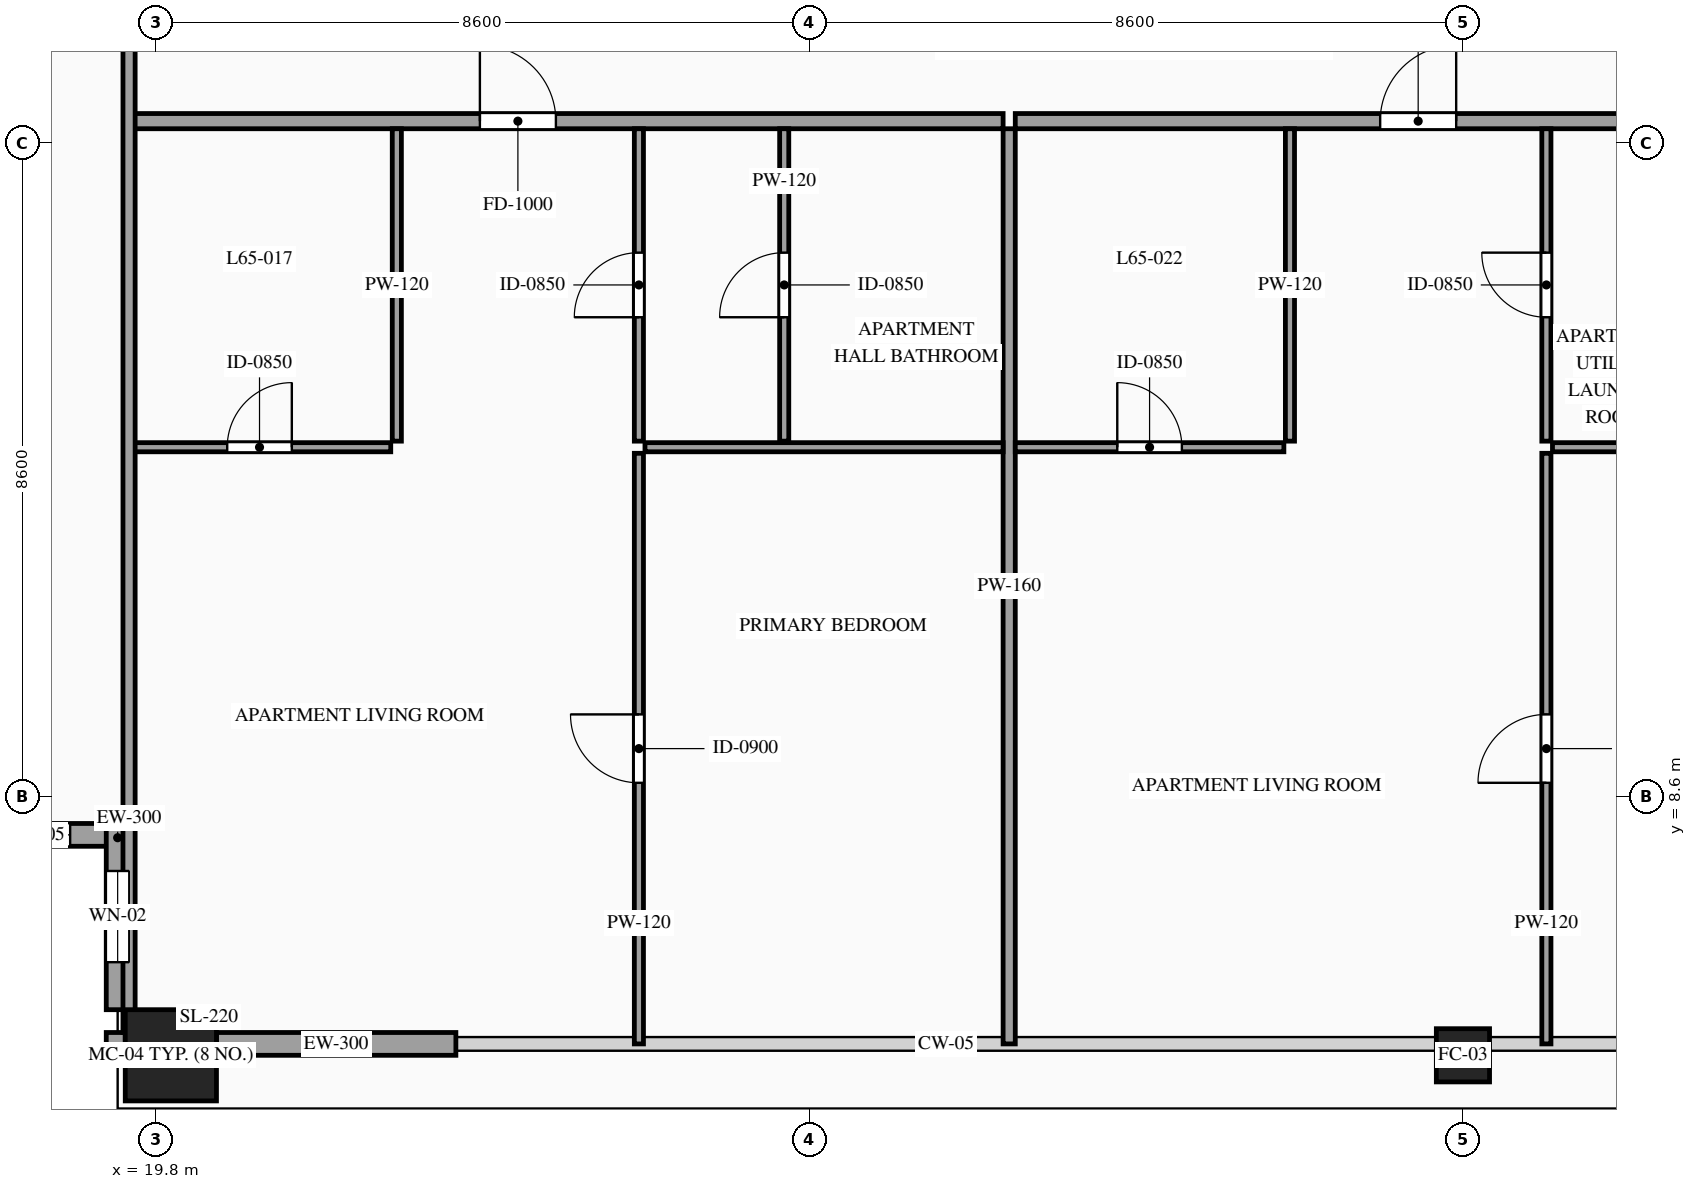
"""IFC4 building model, lengths in metres.
Left out: names, types, materials, properties, quantities, classifications, styles, units other than length and angle.
Written with IfcOpenShell. Run it as: python <this file> out.ifc"""

import sys

from ifc_helpers import new_model, si_unit, direction, frame, frame_2d, origin, origin_2d, place, context, subcontext, project, spatial, rectangle, hollow_rectangle, extrude, source, transform, mapped, element, fill, save


model = new_model("IFC4")
c1 = context("Model", 3, precision=1e-05, world=origin(), true_north=direction((0.0, 1.0)))
c2 = subcontext(c1, "Body", "Model", "MODEL_VIEW")
j1 = project(units=[si_unit("LENGTHUNIT", "METRE"), si_unit("PLANEANGLEUNIT", "RADIAN")], contexts=[c1])
p1 = place(None, origin())
s1 = spatial("IfcSite", under=j1, at=p1, CompositionType="ELEMENT")
p2 = place(p1, origin())
s2 = spatial("IfcBuilding", under=s1, at=p2, CompositionType="ELEMENT")
p3 = place(p2, frame((0.0, 0.0, 245.1)))
s3 = spatial("IfcBuildingStorey", under=s2, at=p3, CompositionType="ELEMENT", Elevation=245.1)
m1 = source(origin(), c2, "Body", "SweptSolid", [
    extrude(hollow_rectangle(XDim=1.2, YDim=1.2, WallThickness=0.055, at=origin_2d()), origin(), (0.0, 0.0, 1.0), 3.5),
])
p4 = place(p3, frame((20.0, 5.2, 0.0), z_axis=(0.0, 0.0, 1.0), x_axis=(1.0, 0.0, 0.0)))
e1 = element("IfcColumn", 1, at=p4, inside=s3, PredefinedType="COLUMN", context=c2, shape_type="MappedRepresentation", body=[
    mapped(m1, transform((0.0, 0.0, 0.0), scale=1.0)),
])
m2 = source(origin(), c2, "Body", "SweptSolid", [
    extrude(hollow_rectangle(XDim=0.7, YDim=0.7, WallThickness=0.032, at=origin_2d()), origin(), (0.0, 0.0, 1.0), 3.5),
])
p5 = place(p3, frame((37.0, 5.2, 0.0), z_axis=(0.0, 0.0, 1.0), x_axis=(1.0, 0.0, 0.0)))
e2 = element("IfcColumn", 2, at=p5, inside=s3, PredefinedType="COLUMN", context=c2, shape_type="MappedRepresentation", body=[
    mapped(m2, transform((0.0, 0.0, 0.0), scale=1.0)),
])
p6 = place(p3, frame((17.0, 8.1, 0.0), z_axis=(0.0, 0.0, 1.0), x_axis=(1.0, 0.0, 0.0)))
e3 = element("IfcWall", 3, at=p6, inside=s3, PredefinedType="SOLIDWALL", context=c2, shape_type="SweptSolid", body=[
    extrude(rectangle(XDim=2.45, YDim=0.3, at=frame_2d((1.225, 0.0))), origin(), (0.0, 0.0, 1.0), 3.28),
])
p7 = place(p6, frame((0.775, 0.0, 0.85)))
e4 = element("IfcOpeningElement", 4, at=p7, cuts=e3, PredefinedType="OPENING", context=c2, shape_type="SweptSolid", body=[
    extrude(rectangle(XDim=0.9, YDim=1.5, at=frame_2d((0.45, 0.75))), frame((0.0, 0.165, 0.0), z_axis=(0.0, -1.0, 0.0), x_axis=(1.0, 0.0, 0.0)), (0.0, 0.0, 1.0), 0.33),
])
p8 = place(p3, frame((19.3, 8.25, 0.0), z_axis=(0.0, 0.0, 1.0), x_axis=(0.0, -1.0, 0.0)))
e5 = element("IfcWall", 5, at=p8, inside=s3, PredefinedType="SOLIDWALL", context=c2, shape_type="SweptSolid", body=[
    extrude(rectangle(XDim=2.45, YDim=0.3, at=frame_2d((1.225, 0.0))), origin(), (0.0, 0.0, 1.0), 3.28),
])
p9 = place(p8, frame((0.625, 0.0, 0.85)))
e6 = element("IfcOpeningElement", 6, at=p9, cuts=e5, PredefinedType="OPENING", context=c2, shape_type="SweptSolid", body=[
    extrude(rectangle(XDim=1.2, YDim=2.1, at=frame_2d((0.6, 1.05))), frame((0.0, 0.165, 0.0), z_axis=(0.0, -1.0, 0.0), x_axis=(1.0, 0.0, 0.0)), (0.0, 0.0, 1.0), 0.33),
])
m3 = source(origin(), c2, "Body", "SweptSolid", [
    extrude(rectangle(XDim=0.25, YDim=0.3, at=frame_2d((0.125, 0.0))), origin(), (0.0, 0.0, 1.0), 3.28),
])
p10 = place(p3, frame((19.15, 5.35, 0.0), z_axis=(0.0, 0.0, 1.0), x_axis=(1.0, 0.0, 0.0)))
e7 = element("IfcWall", 7, at=p10, inside=s3, PredefinedType="SOLIDWALL", context=c2, shape_type="MappedRepresentation", body=[
    mapped(m3, transform((0.0, 0.0, 0.0), scale=1.0)),
])
m4 = source(origin(), c2, "Body", "SweptSolid", [
    extrude(rectangle(XDim=3.15, YDim=0.3, at=frame_2d((1.575, 0.0))), origin(), (0.0, 0.0, 1.0), 2.835),
])
p11 = place(p3, frame((20.6, 5.35, 0.0), z_axis=(0.0, 0.0, 1.0), x_axis=(1.0, 0.0, 0.0)))
e8 = element("IfcWall", 8, at=p11, inside=s3, PredefinedType="SOLIDWALL", context=c2, shape_type="MappedRepresentation", body=[
    mapped(m4, transform((0.0, 0.0, 0.0), scale=1.0)),
])
p12 = place(p3, frame((19.44, 17.49, 0.0), z_axis=(0.0, 0.0, 1.0), x_axis=(1.0, 0.0, 0.0)))
e9 = element("IfcWall", 9, at=p12, inside=s3, PredefinedType="PARTITIONING", context=c2, shape_type="SweptSolid", body=[
    extrude(rectangle(XDim=11.51, YDim=0.2, at=frame_2d((5.755, 0.0))), origin(), (0.0, 0.0, 1.0), 3.28),
])
p13 = place(p12, frame((4.626, 0.0, 0.0)))
e10 = element("IfcOpeningElement", 10, at=p13, cuts=e9, PredefinedType="OPENING", context=c2, shape_type="SweptSolid", body=[
    extrude(rectangle(XDim=1.0, YDim=2.2, at=frame_2d((0.5, 1.1))), frame((0.0, 0.115, 0.0), z_axis=(0.0, -1.0, 0.0), x_axis=(1.0, 0.0, 0.0)), (0.0, 0.0, 1.0), 0.23),
])
m5 = source(origin(), c2, "Body", "SweptSolid", [
    extrude(rectangle(XDim=12.04, YDim=0.16, at=frame_2d((6.02, 0.0))), origin(), (0.0, 0.0, 1.0), 3.28),
])
p14 = place(p3, frame((31.03, 5.35, 0.0), z_axis=(0.0, 0.0, 1.0), x_axis=(0.0, 1.0, 0.0)))
e11 = element("IfcWall", 11, at=p14, inside=s3, PredefinedType="PARTITIONING", context=c2, shape_type="MappedRepresentation", body=[
    mapped(m5, transform((0.0, 0.0, 0.0), scale=1.0)),
])
p15 = place(p3, frame((19.44, 13.2, 0.0), z_axis=(0.0, 0.0, 1.0), x_axis=(1.0, 0.0, 0.0)))
e12 = element("IfcWall", 12, at=p15, inside=s3, PredefinedType="PARTITIONING", context=c2, shape_type="SweptSolid", body=[
    extrude(rectangle(XDim=3.453, YDim=0.12, at=frame_2d((1.727, 0.0))), origin(), (0.0, 0.0, 1.0), 3.28),
])
p16 = place(p15, frame((1.302, 0.0, 0.0)))
e13 = element("IfcOpeningElement", 13, at=p16, cuts=e12, PredefinedType="OPENING", context=c2, shape_type="SweptSolid", body=[
    extrude(rectangle(XDim=0.85, YDim=2.1, at=frame_2d((0.425, 1.05))), frame((0.0, 0.075, 0.0), z_axis=(0.0, -1.0, 0.0), x_axis=(1.0, 0.0, 0.0)), (0.0, 0.0, 1.0), 0.15),
])
m6 = source(origin(), c2, "Body", "SweptSolid", [
    extrude(rectangle(XDim=4.11, YDim=0.12, at=frame_2d((2.055, 0.0))), origin(), (0.0, 0.0, 1.0), 3.28),
])
p17 = place(p3, frame((22.973, 13.28, 0.0), z_axis=(0.0, 0.0, 1.0), x_axis=(0.0, 1.0, 0.0)))
e14 = element("IfcWall", 14, at=p17, inside=s3, PredefinedType="PARTITIONING", context=c2, shape_type="MappedRepresentation", body=[
    mapped(m6, transform((0.0, 0.0, 0.0), scale=1.0)),
])
p18 = place(p3, frame((28.07, 13.28, 0.0), z_axis=(0.0, 0.0, 1.0), x_axis=(0.0, 1.0, 0.0)))
e15 = element("IfcWall", 15, at=p18, inside=s3, PredefinedType="PARTITIONING", context=c2, shape_type="SweptSolid", body=[
    extrude(rectangle(XDim=4.11, YDim=0.12, at=frame_2d((2.055, 0.0))), origin(), (0.0, 0.0, 1.0), 3.28),
])
p19 = place(p18, frame((1.63, 0.0, 0.0)))
e16 = element("IfcOpeningElement", 16, at=p19, cuts=e15, PredefinedType="OPENING", context=c2, shape_type="SweptSolid", body=[
    extrude(rectangle(XDim=0.85, YDim=2.1, at=frame_2d((0.425, 1.05))), frame((0.0, 0.075, 0.0), z_axis=(0.0, -1.0, 0.0), x_axis=(1.0, 0.0, 0.0)), (0.0, 0.0, 1.0), 0.15),
])
m7 = source(origin(), c2, "Body", "SweptSolid", [
    extrude(rectangle(XDim=4.712, YDim=0.12, at=frame_2d((2.356, 0.0))), origin(), (0.0, 0.0, 1.0), 3.28),
])
p20 = place(p3, frame((26.238, 13.2, 0.0), z_axis=(0.0, 0.0, 1.0), x_axis=(1.0, 0.0, 0.0)))
e17 = element("IfcWall", 17, at=p20, inside=s3, PredefinedType="PARTITIONING", context=c2, shape_type="MappedRepresentation", body=[
    mapped(m7, transform((0.0, 0.0, 0.0), scale=1.0)),
])
p21 = place(p3, frame((26.158, 5.35, 0.0), z_axis=(0.0, 0.0, 1.0), x_axis=(0.0, 1.0, 0.0)))
e18 = element("IfcWall", 18, at=p21, inside=s3, PredefinedType="PARTITIONING", context=c2, shape_type="SweptSolid", body=[
    extrude(rectangle(XDim=7.77, YDim=0.12, at=frame_2d((3.885, 0.0))), origin(), (0.0, 0.0, 1.0), 3.28),
])
p22 = place(p21, frame((3.435, 0.0, 0.0)))
e19 = element("IfcOpeningElement", 19, at=p22, cuts=e18, PredefinedType="OPENING", context=c2, shape_type="SweptSolid", body=[
    extrude(rectangle(XDim=0.9, YDim=2.15, at=frame_2d((0.45, 1.075))), frame((0.0, 0.075, 0.0), z_axis=(0.0, -1.0, 0.0), x_axis=(1.0, 0.0, 0.0)), (0.0, 0.0, 1.0), 0.15),
])
p23 = place(p3, frame((26.158, 13.28, 0.0), z_axis=(0.0, 0.0, 1.0), x_axis=(0.0, 1.0, 0.0)))
e20 = element("IfcWall", 20, at=p23, inside=s3, PredefinedType="PARTITIONING", context=c2, shape_type="SweptSolid", body=[
    extrude(rectangle(XDim=4.11, YDim=0.12, at=frame_2d((2.055, 0.0))), origin(), (0.0, 0.0, 1.0), 3.28),
])
p24 = place(p23, frame((1.63, 0.0, 0.0)))
e21 = element("IfcOpeningElement", 21, at=p24, cuts=e20, PredefinedType="OPENING", context=c2, shape_type="SweptSolid", body=[
    extrude(rectangle(XDim=0.85, YDim=2.1, at=frame_2d((0.425, 1.05))), frame((0.0, 0.075, 0.0), z_axis=(0.0, -1.0, 0.0), x_axis=(1.0, 0.0, 0.0)), (0.0, 0.0, 1.0), 0.15),
])
p25 = place(p3, frame((31.11, 17.49, 0.0), z_axis=(0.0, 0.0, 1.0), x_axis=(1.0, 0.0, 0.0)))
e22 = element("IfcWall", 22, at=p25, inside=s3, PredefinedType="PARTITIONING", context=c2, shape_type="SweptSolid", body=[
    extrude(rectangle(XDim=11.78, YDim=0.2, at=frame_2d((5.89, 0.0))), origin(), (0.0, 0.0, 1.0), 3.28),
])
p26 = place(p25, frame((4.801, 0.0, 0.0)))
e23 = element("IfcOpeningElement", 23, at=p26, cuts=e22, PredefinedType="OPENING", context=c2, shape_type="SweptSolid", body=[
    extrude(rectangle(XDim=1.0, YDim=2.2, at=frame_2d((0.5, 1.1))), frame((0.0, 0.115, 0.0), z_axis=(0.0, -1.0, 0.0), x_axis=(1.0, 0.0, 0.0)), (0.0, 0.0, 1.0), 0.23),
])
p27 = place(p3, frame((31.11, 13.2, 0.0), z_axis=(0.0, 0.0, 1.0), x_axis=(1.0, 0.0, 0.0)))
e24 = element("IfcWall", 24, at=p27, inside=s3, PredefinedType="PARTITIONING", context=c2, shape_type="SweptSolid", body=[
    extrude(rectangle(XDim=3.534, YDim=0.12, at=frame_2d((1.767, 0.0))), origin(), (0.0, 0.0, 1.0), 3.28),
])
p28 = place(p27, frame((1.342, 0.0, 0.0)))
e25 = element("IfcOpeningElement", 25, at=p28, cuts=e24, PredefinedType="OPENING", context=c2, shape_type="SweptSolid", body=[
    extrude(rectangle(XDim=0.85, YDim=2.1, at=frame_2d((0.425, 1.05))), frame((0.0, 0.075, 0.0), z_axis=(0.0, -1.0, 0.0), x_axis=(1.0, 0.0, 0.0)), (0.0, 0.0, 1.0), 0.15),
])
p29 = place(p3, frame((34.724, 13.28, 0.0), z_axis=(0.0, 0.0, 1.0), x_axis=(0.0, 1.0, 0.0)))
e26 = element("IfcWall", 26, at=p29, inside=s3, PredefinedType="PARTITIONING", context=c2, shape_type="MappedRepresentation", body=[
    mapped(m6, transform((0.0, 0.0, 0.0), scale=1.0)),
])
p30 = place(p3, frame((38.178, 13.2, 0.0), z_axis=(0.0, 0.0, 1.0), x_axis=(1.0, 0.0, 0.0)))
e27 = element("IfcWall", 27, at=p30, inside=s3, PredefinedType="PARTITIONING", context=c2, shape_type="MappedRepresentation", body=[
    mapped(m7, transform((0.0, 0.0, 0.0), scale=1.0)),
])
p31 = place(p3, frame((38.098, 5.35, 0.0), z_axis=(0.0, 0.0, 1.0), x_axis=(0.0, 1.0, 0.0)))
e28 = element("IfcWall", 28, at=p31, inside=s3, PredefinedType="PARTITIONING", context=c2, shape_type="SweptSolid", body=[
    extrude(rectangle(XDim=7.77, YDim=0.12, at=frame_2d((3.885, 0.0))), origin(), (0.0, 0.0, 1.0), 3.28),
])
p32 = place(p31, frame((3.435, 0.0, 0.0)))
e29 = element("IfcOpeningElement", 29, at=p32, cuts=e28, PredefinedType="OPENING", context=c2, shape_type="SweptSolid", body=[
    extrude(rectangle(XDim=0.9, YDim=2.15, at=frame_2d((0.45, 1.075))), frame((0.0, 0.075, 0.0), z_axis=(0.0, -1.0, 0.0), x_axis=(1.0, 0.0, 0.0)), (0.0, 0.0, 1.0), 0.15),
])
p33 = place(p3, frame((38.098, 13.28, 0.0), z_axis=(0.0, 0.0, 1.0), x_axis=(0.0, 1.0, 0.0)))
e30 = element("IfcWall", 30, at=p33, inside=s3, PredefinedType="PARTITIONING", context=c2, shape_type="SweptSolid", body=[
    extrude(rectangle(XDim=4.11, YDim=0.12, at=frame_2d((2.055, 0.0))), origin(), (0.0, 0.0, 1.0), 3.28),
])
p34 = place(p33, frame((1.63, 0.0, 0.0)))
e31 = element("IfcOpeningElement", 31, at=p34, cuts=e30, PredefinedType="OPENING", context=c2, shape_type="SweptSolid", body=[
    extrude(rectangle(XDim=0.85, YDim=2.1, at=frame_2d((0.425, 1.05))), frame((0.0, 0.075, 0.0), z_axis=(0.0, -1.0, 0.0), x_axis=(1.0, 0.0, 0.0)), (0.0, 0.0, 1.0), 0.15),
])
m8 = source(origin(), c2, "Body", "SweptSolid", [
    extrude(rectangle(XDim=26.69, YDim=0.16, at=frame_2d((13.345, 0.0))), origin(), (0.0, 0.0, 1.0), 3.28),
])
p35 = place(p3, frame((19.45, 5.5, 0.0), z_axis=(0.0, 0.0, 1.0), x_axis=(0.0, 1.0, 0.0)))
e32 = element("IfcWall", 32, at=p35, inside=s3, PredefinedType="PARTITIONING", context=c2, shape_type="MappedRepresentation", body=[
    mapped(m8, transform((0.0, 0.0, 0.0), scale=1.0)),
])
m9 = source(origin(), c2, "Body", "SweptSolid", [
    extrude(rectangle(XDim=0.9, YDim=1.5, at=frame_2d((0.45, 0.75))), frame((0.0, 0.03, 0.0), z_axis=(0.0, -1.0, 0.0), x_axis=(1.0, 0.0, 0.0)), (0.0, 0.0, 1.0), 0.06),
])
p36 = place(p7, origin())
e33 = element("IfcWindow", 33, at=p36, inside=s3, PartitioningType="SINGLE_PANEL", PredefinedType="WINDOW", context=c2, shape_type="MappedRepresentation", body=[
    mapped(m9, transform((0.0, 0.0, 0.0), scale=1.0)),
])
fill(e4, e33)
m10 = source(origin(), c2, "Body", "SweptSolid", [
    extrude(rectangle(XDim=1.2, YDim=2.1, at=frame_2d((0.6, 1.05))), frame((0.0, 0.03, 0.0), z_axis=(0.0, -1.0, 0.0), x_axis=(1.0, 0.0, 0.0)), (0.0, 0.0, 1.0), 0.06),
])
p37 = place(p9, origin())
e34 = element("IfcWindow", 34, at=p37, inside=s3, PartitioningType="SINGLE_PANEL", PredefinedType="WINDOW", context=c2, shape_type="MappedRepresentation", body=[
    mapped(m10, transform((0.0, 0.0, 0.0), scale=1.0)),
])
fill(e6, e34)
m11 = source(origin(), c2, "Body", "SweptSolid", [
    extrude(rectangle(XDim=1.0, YDim=2.2, at=frame_2d((0.5, 1.1))), frame((0.0, 0.025, 0.0), z_axis=(0.0, -1.0, 0.0), x_axis=(1.0, 0.0, 0.0)), (0.0, 0.0, 1.0), 0.05),
])
p38 = place(p13, origin())
e35 = element("IfcDoor", 35, at=p38, inside=s3, OperationType="SINGLE_SWING_LEFT", PredefinedType="DOOR", context=c2, shape_type="MappedRepresentation", body=[
    mapped(m11, transform((0.0, 0.0, 0.0), scale=1.0)),
])
fill(e10, e35)
m12 = source(origin(), c2, "Body", "SweptSolid", [
    extrude(rectangle(XDim=0.85, YDim=2.1, at=frame_2d((0.425, 1.05))), frame((0.0, 0.025, 0.0), z_axis=(0.0, -1.0, 0.0), x_axis=(1.0, 0.0, 0.0)), (0.0, 0.0, 1.0), 0.05),
])
p39 = place(p16, origin())
e36 = element("IfcDoor", 36, at=p39, inside=s3, OperationType="SINGLE_SWING_RIGHT", PredefinedType="DOOR", context=c2, shape_type="MappedRepresentation", body=[
    mapped(m12, transform((0.0, 0.0, 0.0), scale=1.0)),
])
fill(e13, e36)
p40 = place(p19, origin())
e37 = element("IfcDoor", 37, at=p40, inside=s3, OperationType="SINGLE_SWING_LEFT", PredefinedType="DOOR", context=c2, shape_type="MappedRepresentation", body=[
    mapped(m12, transform((0.0, 0.0, 0.0), scale=1.0)),
])
fill(e16, e37)
m13 = source(origin(), c2, "Body", "SweptSolid", [
    extrude(rectangle(XDim=0.9, YDim=2.15, at=frame_2d((0.45, 1.075))), frame((0.0, 0.025, 0.0), z_axis=(0.0, -1.0, 0.0), x_axis=(1.0, 0.0, 0.0)), (0.0, 0.0, 1.0), 0.05),
])
p41 = place(p22, origin())
e38 = element("IfcDoor", 38, at=p41, inside=s3, OperationType="SINGLE_SWING_RIGHT", PredefinedType="DOOR", context=c2, shape_type="MappedRepresentation", body=[
    mapped(m13, transform((0.0, 0.0, 0.0), scale=1.0)),
])
fill(e19, e38)
p42 = place(p24, origin())
e39 = element("IfcDoor", 39, at=p42, inside=s3, OperationType="SINGLE_SWING_LEFT", PredefinedType="DOOR", context=c2, shape_type="MappedRepresentation", body=[
    mapped(m12, transform((0.0, 0.0, 0.0), scale=1.0)),
])
fill(e21, e39)
p43 = place(p26, origin())
e40 = element("IfcDoor", 40, at=p43, inside=s3, OperationType="SINGLE_SWING_RIGHT", PredefinedType="DOOR", context=c2, shape_type="MappedRepresentation", body=[
    mapped(m11, transform((0.0, 0.0, 0.0), scale=1.0)),
])
fill(e23, e40)
p44 = place(p28, origin())
e41 = element("IfcDoor", 41, at=p44, inside=s3, OperationType="SINGLE_SWING_LEFT", PredefinedType="DOOR", context=c2, shape_type="MappedRepresentation", body=[
    mapped(m12, transform((0.0, 0.0, 0.0), scale=1.0)),
])
fill(e25, e41)
p45 = place(p32, origin())
e42 = element("IfcDoor", 42, at=p45, inside=s3, OperationType="SINGLE_SWING_LEFT", PredefinedType="DOOR", context=c2, shape_type="MappedRepresentation", body=[
    mapped(m13, transform((0.0, 0.0, 0.0), scale=1.0)),
])
fill(e29, e42)
p46 = place(p34, origin())
e43 = element("IfcDoor", 43, at=p46, inside=s3, OperationType="SINGLE_SWING_RIGHT", PredefinedType="DOOR", context=c2, shape_type="MappedRepresentation", body=[
    mapped(m12, transform((0.0, 0.0, 0.0), scale=1.0)),
])
fill(e31, e43)
save(model, sys.argv[1])
